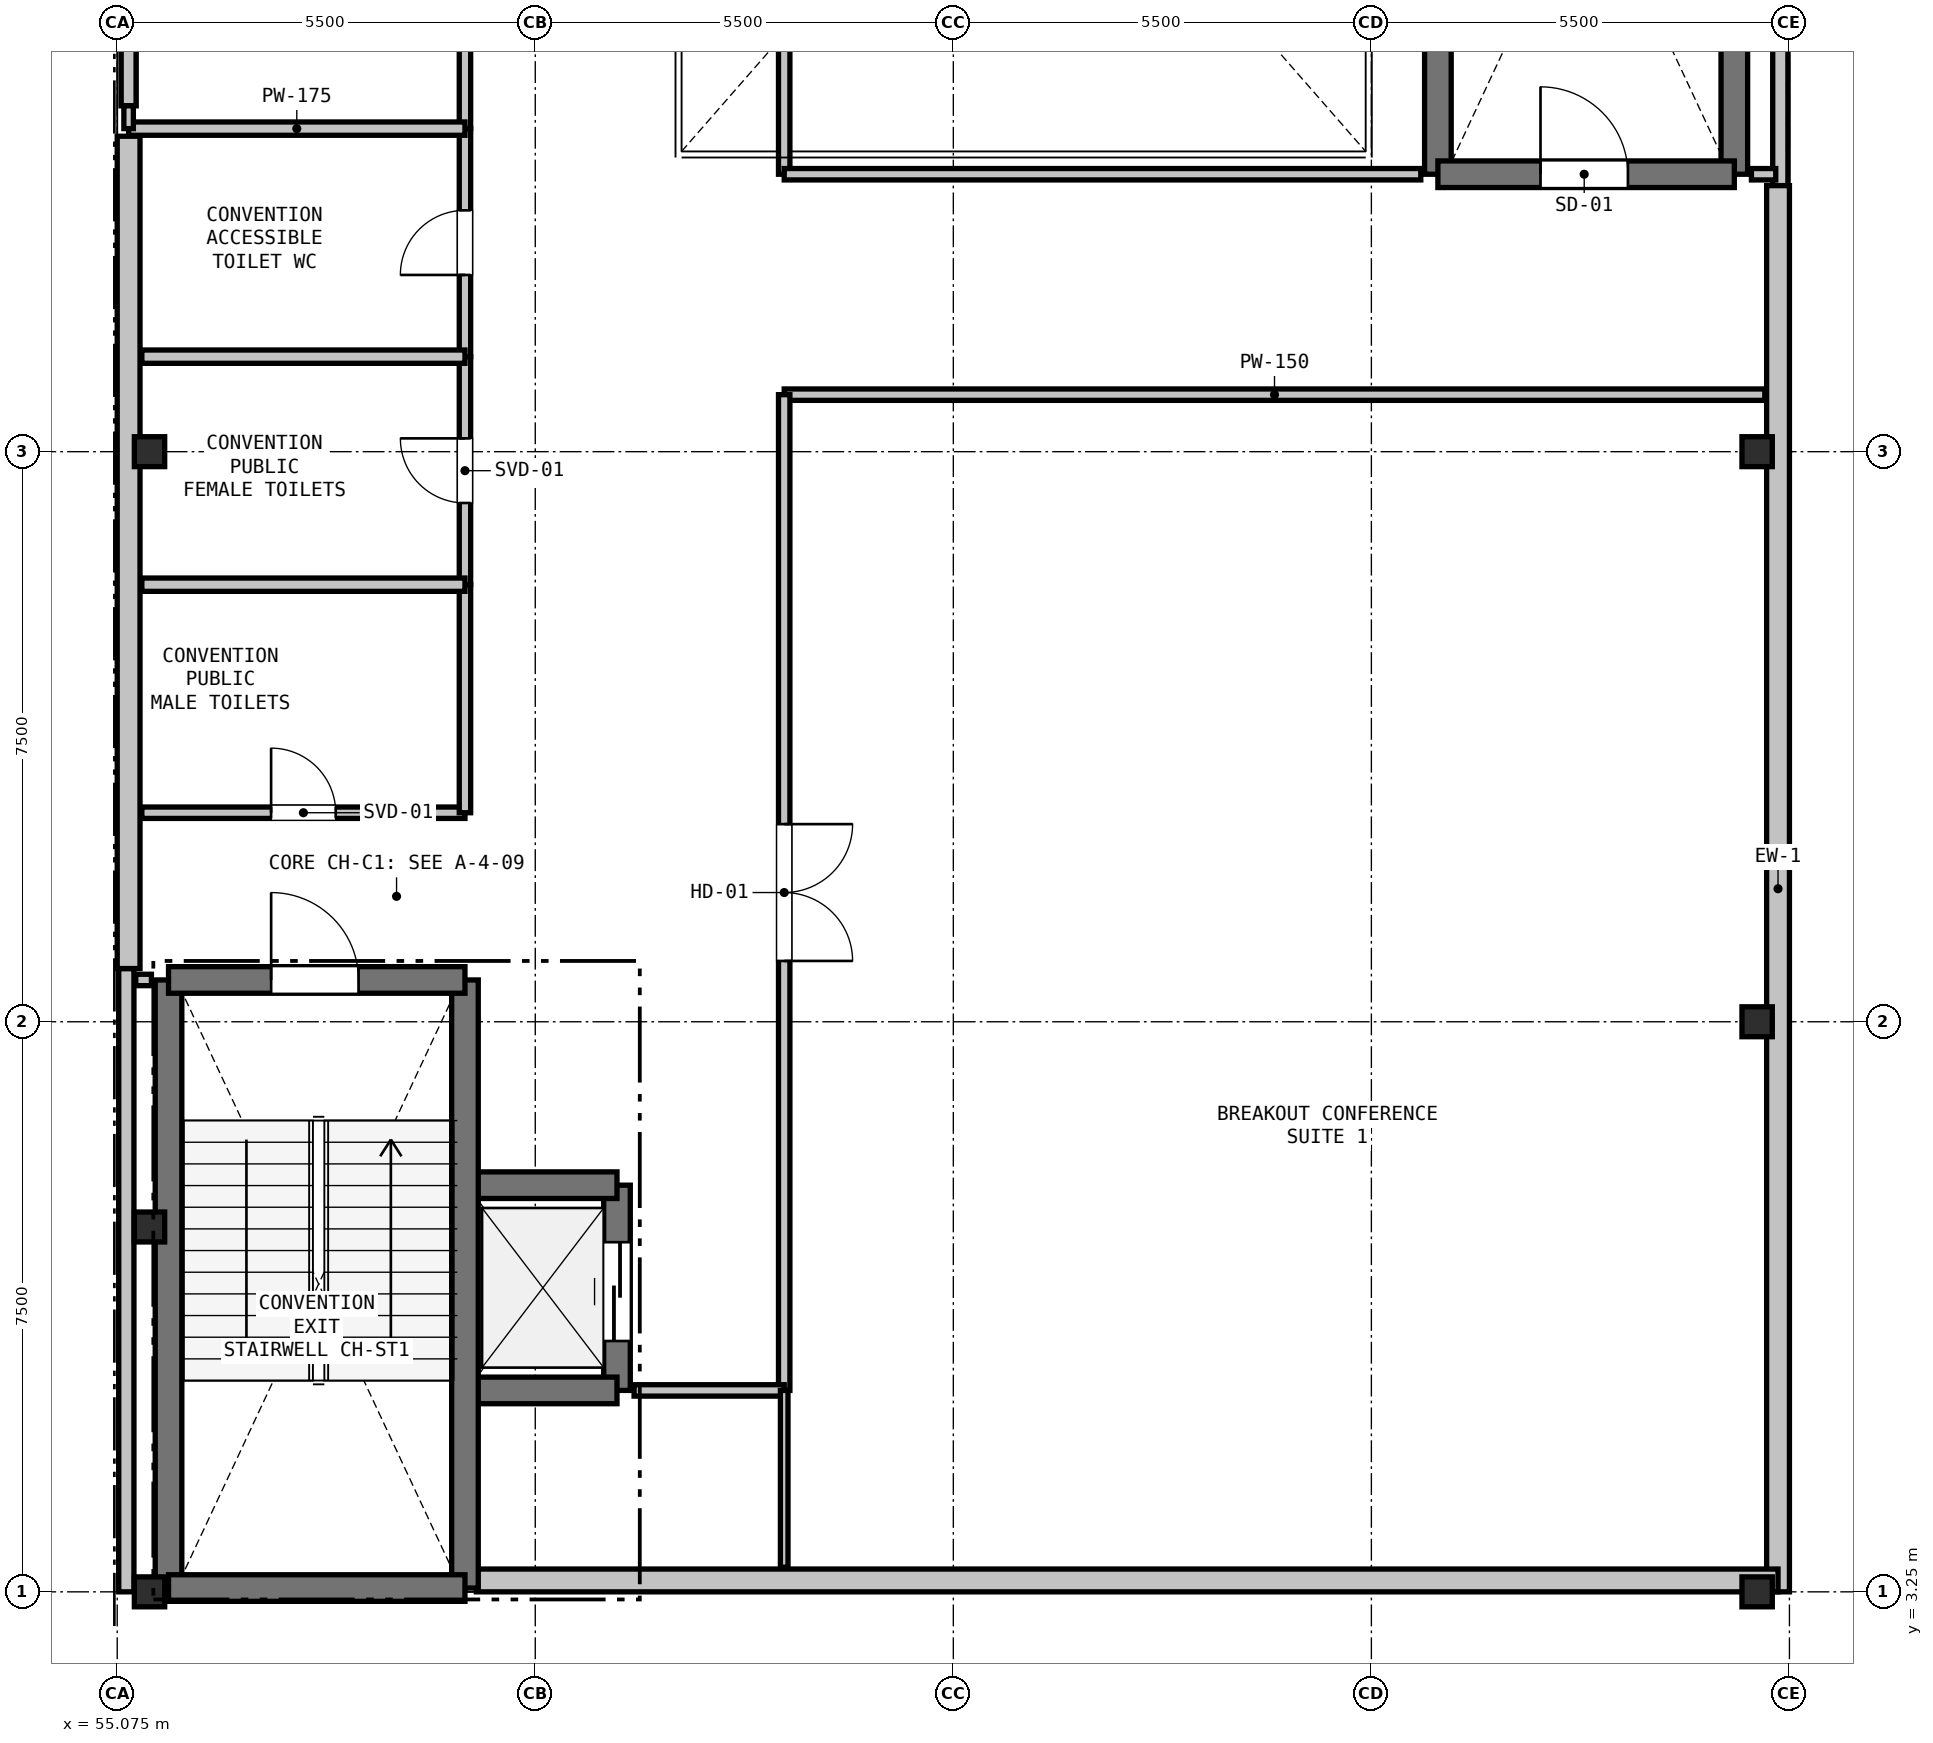
"""IFC4 building model, lengths in metres.
Left out: names, types, materials, properties, quantities, classifications, styles, units other than length and angle.
Written with IfcOpenShell. Run it as: python <this file> out.ifc"""

import sys

from ifc_helpers import new_model, si_unit, direction, frame, frame_2d, origin, origin_2d, place, context, subcontext, project, spatial, rectangle, i_section, extrude, element, fill, save


model = new_model("IFC4")
c1 = context("Model", 3, precision=1e-05, world=origin(), true_north=direction((0.0, 1.0)))
c2 = subcontext(c1, "Body", "Model", "MODEL_VIEW")
j1 = project(units=[si_unit("LENGTHUNIT", "METRE"), si_unit("PLANEANGLEUNIT", "RADIAN")], contexts=[c1])
p1 = place(None, origin())
s1 = spatial("IfcSite", under=j1, at=p1, CompositionType="ELEMENT")
p2 = place(p1, origin())
s2 = spatial("IfcBuilding", under=s1, at=p2, CompositionType="ELEMENT")
p3 = place(p2, frame((0.0, 0.0, 5.1)))
s3 = spatial("IfcBuildingStorey", under=s2, at=p3, CompositionType="ELEMENT", Elevation=5.1)
for number, where, z_axis, x_axis in (
    (1, (55.5, 3.25, 0.0), (0.0, 0.0, 1.0), (1.0, 0.0, 0.0)),
    (2, (55.5, 8.05, 0.0), (0.0, 0.0, 1.0), (1.0, 0.0, 0.0)),
    (3, (55.5, 18.25, 0.0), (0.0, 0.0, 1.0), (1.0, 0.0, 0.0)),
    (4, (76.65, 3.25, 0.0), (0.0, 0.0, 1.0), (1.0, 0.0, 0.0)),
    (5, (76.65, 10.75, 0.0), (0.0, 0.0, 1.0), (1.0, 0.0, 0.0)),
    (6, (76.65, 18.25, 0.0), (0.0, 0.0, 1.0), (1.0, 0.0, 0.0)),
):
    element("IfcColumn", number, at=place(p3, frame(where, z_axis=z_axis, x_axis=x_axis)), inside=s3, PredefinedType="COLUMN", context=c2, shape_type="SweptSolid", body=[
        extrude(i_section(OverallWidth=0.399, OverallDepth=0.394, WebThickness=0.023, FlangeThickness=0.037, at=origin_2d()), origin(), (0.0, 0.0, 1.0), 4.5),
    ])
p4 = place(p3, frame((55.195, 3.25, 0.0), z_axis=(0.0, 0.0, 1.0), x_axis=(0.0, 1.0, 0.0)))
e7 = element("IfcWall", 7, at=p4, inside=s3, PredefinedType="PARAPET", context=c2, shape_type="SweptSolid", body=[
    extrude(rectangle(XDim=8.2, YDim=0.2, at=frame_2d((4.1, 0.0))), origin(), (0.0, 0.0, 1.0), 3.79),
])
p5 = place(p3, frame((76.955, 30.1, 0.0), z_axis=(0.0, 0.0, 1.0), x_axis=(0.0, -1.0, 0.0)))
e8 = element("IfcWall", 8, at=p5, inside=s3, PredefinedType="PARAPET", context=c2, shape_type="SweptSolid", body=[
    extrude(rectangle(XDim=8.35, YDim=0.2, at=frame_2d((4.175, 0.0))), origin(), (0.0, 0.0, 1.0), 3.79),
])
p6 = place(p3, frame((55.225, 11.45, 0.0), z_axis=(0.0, 0.0, 1.0), x_axis=(0.0, 1.0, 0.0)))
e9 = element("IfcWall", 9, at=p6, inside=s3, PredefinedType="SOLIDWALL", context=c2, shape_type="SweptSolid", body=[
    extrude(rectangle(XDim=10.95, YDim=0.3, at=frame_2d((5.475, 0.0))), origin(), (0.0, 0.0, 1.0), 3.79),
])
p7 = place(p3, frame((76.925, 21.75, 0.0), z_axis=(0.0, 0.0, 1.0), x_axis=(0.0, -1.0, 0.0)))
e10 = element("IfcWall", 10, at=p7, inside=s3, PredefinedType="SOLIDWALL", context=c2, shape_type="SweptSolid", body=[
    extrude(rectangle(XDim=18.5, YDim=0.3, at=frame_2d((9.25, 0.0))), origin(), (0.0, 0.0, 1.0), 3.79),
])
p8 = place(p3, frame((76.925, 3.4, 0.0), z_axis=(0.0, 0.0, 1.0), x_axis=(-1.0, 0.0, 0.0)))
e11 = element("IfcWall", 11, at=p8, inside=s3, PredefinedType="SOLIDWALL", context=c2, shape_type="SweptSolid", body=[
    extrude(rectangle(XDim=17.125, YDim=0.3, at=frame_2d((8.562, 0.0))), origin(), (0.0, 0.0, 1.0), 3.238),
])
p9 = place(p3, frame((55.225, 22.8, 0.0), z_axis=(0.0, 0.0, 1.0), x_axis=(0.0, 1.0, 0.0)))
e12 = element("IfcWall", 12, at=p9, inside=s3, PredefinedType="PARAPET", context=c2, shape_type="SweptSolid", body=[
    extrude(rectangle(XDim=16.0, YDim=0.2, at=frame_2d((8.0, 0.0))), origin(), (0.0, 0.0, 1.0), 0.2),
])
p10 = place(p3, frame((61.65, 5.9, 0.0), z_axis=(0.0, 0.0, 1.0), x_axis=(0.0, 1.0, 0.0)))
e13 = element("IfcWall", 13, at=p10, inside=s3, PredefinedType="SHEAR", context=c2, shape_type="SweptSolid", body=[
    extrude(rectangle(XDim=2.7, YDim=0.35, at=frame_2d((1.35, 0.0))), origin(), (0.0, 0.0, 1.0), 4.18),
])
p11 = place(p10, frame((0.65, 0.0, 0.0)))
e14 = element("IfcOpeningElement", 14, at=p11, cuts=e13, PredefinedType="OPENING", context=c2, shape_type="SweptSolid", body=[
    extrude(rectangle(XDim=1.3, YDim=2.2, at=frame_2d((0.65, 1.1))), frame((0.0, 0.185, 0.0), z_axis=(0.0, -1.0, 0.0), x_axis=(1.0, 0.0, 0.0)), (0.0, 0.0, 1.0), 0.37),
])
for number, where, z_axis, x_axis in (
    (15, (59.65, 8.6, 0.0), (0.0, 0.0, 1.0), (1.0, 0.0, 0.0)),
    (16, (59.65, 5.9, 0.0), (0.0, 0.0, 1.0), (1.0, 0.0, 0.0)),
):
    element("IfcWall", number, at=place(p3, frame(where, z_axis=z_axis, x_axis=x_axis)), inside=s3, PredefinedType="SHEAR", context=c2, shape_type="SweptSolid", body=[
        extrude(rectangle(XDim=2.0, YDim=0.35, at=frame_2d((1.0, 0.0))), origin(), (0.0, 0.0, 1.0), 4.18),
    ])
for number, where, z_axis, x_axis in (
    (17, (59.65, 11.3, 0.0), (0.0, 0.0, 1.0), (0.0, -1.0, 0.0)),
    (18, (55.75, 3.3, 0.0), (0.0, 0.0, 1.0), (0.0, 1.0, 0.0)),
):
    element("IfcWall", number, at=place(p3, frame(where, z_axis=z_axis, x_axis=x_axis)), inside=s3, PredefinedType="SHEAR", context=c2, shape_type="SweptSolid", body=[
        extrude(rectangle(XDim=8.0, YDim=0.35, at=frame_2d((4.0, 0.0))), origin(), (0.0, 0.0, 1.0), 4.18),
    ])
p12 = place(p3, frame((55.75, 11.3, 0.0), z_axis=(0.0, 0.0, 1.0), x_axis=(1.0, 0.0, 0.0)))
e19 = element("IfcWall", 19, at=p12, inside=s3, PredefinedType="SHEAR", context=c2, shape_type="SweptSolid", body=[
    extrude(rectangle(XDim=3.9, YDim=0.35, at=frame_2d((1.95, 0.0))), origin(), (0.0, 0.0, 1.0), 4.18),
])
p13 = place(p12, frame((1.35, 0.0, 0.0)))
e20 = element("IfcOpeningElement", 20, at=p13, cuts=e19, PredefinedType="OPENING", context=c2, shape_type="SweptSolid", body=[
    extrude(rectangle(XDim=1.15, YDim=2.15, at=frame_2d((0.575, 1.075))), frame((0.0, 0.185, 0.0), z_axis=(0.0, -1.0, 0.0), x_axis=(1.0, 0.0, 0.0)), (0.0, 0.0, 1.0), 0.37),
])
p14 = place(p3, frame((55.75, 3.3, 0.0), z_axis=(0.0, 0.0, 1.0), x_axis=(1.0, 0.0, 0.0)))
e21 = element("IfcWall", 21, at=p14, inside=s3, PredefinedType="SHEAR", context=c2, shape_type="SweptSolid", body=[
    extrude(rectangle(XDim=3.9, YDim=0.35, at=frame_2d((1.95, 0.0))), origin(), (0.0, 0.0, 1.0), 4.18),
])
for number, where, z_axis, x_axis in (
    (22, (76.35, 29.9, 0.0), (0.0, 0.0, 1.0), (0.0, -1.0, 0.0)),
    (23, (72.45, 21.9, 0.0), (0.0, 0.0, 1.0), (0.0, 1.0, 0.0)),
):
    element("IfcWall", number, at=place(p3, frame(where, z_axis=z_axis, x_axis=x_axis)), inside=s3, PredefinedType="SHEAR", context=c2, shape_type="SweptSolid", body=[
        extrude(rectangle(XDim=8.0, YDim=0.35, at=frame_2d((4.0, 0.0))), origin(), (0.0, 0.0, 1.0), 4.18),
    ])
p15 = place(p3, frame((72.45, 21.9, 0.0), z_axis=(0.0, 0.0, 1.0), x_axis=(1.0, 0.0, 0.0)))
e24 = element("IfcWall", 24, at=p15, inside=s3, PredefinedType="SHEAR", context=c2, shape_type="SweptSolid", body=[
    extrude(rectangle(XDim=3.9, YDim=0.35, at=frame_2d((1.95, 0.0))), origin(), (0.0, 0.0, 1.0), 4.18),
])
p16 = place(p15, frame((1.35, 0.0, 0.0)))
e25 = element("IfcOpeningElement", 25, at=p16, cuts=e24, PredefinedType="OPENING", context=c2, shape_type="SweptSolid", body=[
    extrude(rectangle(XDim=1.15, YDim=2.15, at=frame_2d((0.575, 1.075))), frame((0.0, 0.185, 0.0), z_axis=(0.0, -1.0, 0.0), x_axis=(1.0, 0.0, 0.0)), (0.0, 0.0, 1.0), 0.37),
])
p17 = place(p3, frame((55.525, 11.3, 0.0), z_axis=(0.0, 0.0, 1.0), x_axis=(-1.0, 0.0, 0.0)))
e26 = element("IfcWall", 26, at=p17, inside=s3, PredefinedType="PARTITIONING", context=c2, shape_type="SweptSolid", body=[
    extrude(rectangle(XDim=0.206, YDim=0.15, at=frame_2d((0.103, 0.0))), origin(), (0.0, 0.0, 1.0), 3.79),
])
p18 = place(p3, frame((55.399, 13.5, 0.0), z_axis=(0.0, 0.0, 1.0), x_axis=(1.0, 0.0, 0.0)))
e27 = element("IfcWall", 27, at=p18, inside=s3, PredefinedType="PARTITIONING", context=c2, shape_type="SweptSolid", body=[
    extrude(rectangle(XDim=4.251, YDim=0.15, at=frame_2d((2.125, 0.0))), origin(), (0.0, 0.0, 1.0), 3.79),
])
p19 = place(p18, frame((1.7, 0.0, 0.0)))
e28 = element("IfcOpeningElement", 28, at=p19, cuts=e27, PredefinedType="OPENING", context=c2, shape_type="SweptSolid", body=[
    extrude(rectangle(XDim=0.85, YDim=2.1, at=frame_2d((0.425, 1.05))), frame((0.0, 0.085, 0.0), z_axis=(0.0, -1.0, 0.0), x_axis=(1.0, 0.0, 0.0)), (0.0, 0.0, 1.0), 0.17),
])
p20 = place(p3, frame((59.65, 13.5, 0.0), z_axis=(0.0, 0.0, 1.0), x_axis=(0.0, 1.0, 0.0)))
e29 = element("IfcWall", 29, at=p20, inside=s3, PredefinedType="PARTITIONING", context=c2, shape_type="SweptSolid", body=[
    extrude(rectangle(XDim=3.0, YDim=0.15, at=frame_2d((1.5, 0.0))), origin(), (0.0, 0.0, 1.0), 4.18),
])
p21 = place(p3, frame((59.65, 16.5, 0.0), z_axis=(0.0, 0.0, 1.0), x_axis=(0.0, 1.0, 0.0)))
e30 = element("IfcWall", 30, at=p21, inside=s3, PredefinedType="PARTITIONING", context=c2, shape_type="SweptSolid", body=[
    extrude(rectangle(XDim=3.0, YDim=0.15, at=frame_2d((1.5, 0.0))), origin(), (0.0, 0.0, 1.0), 3.238),
])
p22 = place(p21, frame((1.075, 0.0, 0.0)))
e31 = element("IfcOpeningElement", 31, at=p22, cuts=e30, PredefinedType="OPENING", context=c2, shape_type="SweptSolid", body=[
    extrude(rectangle(XDim=0.85, YDim=2.1, at=frame_2d((0.425, 1.05))), frame((0.0, 0.085, 0.0), z_axis=(0.0, -1.0, 0.0), x_axis=(1.0, 0.0, 0.0)), (0.0, 0.0, 1.0), 0.17),
])
p23 = place(p3, frame((59.65, 19.5, 0.0), z_axis=(0.0, 0.0, 1.0), x_axis=(0.0, 1.0, 0.0)))
e32 = element("IfcWall", 32, at=p23, inside=s3, PredefinedType="PARTITIONING", context=c2, shape_type="SweptSolid", body=[
    extrude(rectangle(XDim=3.0, YDim=0.15, at=frame_2d((1.5, 0.0))), origin(), (0.0, 0.0, 1.0), 4.18),
])
p24 = place(p23, frame((1.075, 0.0, 0.0)))
e33 = element("IfcOpeningElement", 33, at=p24, cuts=e32, PredefinedType="OPENING", context=c2, shape_type="SweptSolid", body=[
    extrude(rectangle(XDim=0.85, YDim=2.1, at=frame_2d((0.425, 1.05))), frame((0.0, 0.085, 0.0), z_axis=(0.0, -1.0, 0.0), x_axis=(1.0, 0.0, 0.0)), (0.0, 0.0, 1.0), 0.17),
])
p25 = place(p3, frame((59.65, 22.5, 0.0), z_axis=(0.0, 0.0, 1.0), x_axis=(0.0, 1.0, 0.0)))
e34 = element("IfcWall", 34, at=p25, inside=s3, PredefinedType="PARTITIONING", context=c2, shape_type="SweptSolid", body=[
    extrude(rectangle(XDim=15.5, YDim=0.15, at=frame_2d((7.75, 0.0))), origin(), (0.0, 0.0, 1.0), 3.238),
])
p26 = place(p25, frame((7.25, 0.0, 0.0)))
e35 = element("IfcOpeningElement", 35, at=p26, cuts=e34, PredefinedType="OPENING", context=c2, shape_type="SweptSolid", body=[
    extrude(rectangle(XDim=1.0, YDim=2.15, at=frame_2d((0.5, 1.075))), frame((0.0, 0.085, 0.0), z_axis=(0.0, -1.0, 0.0), x_axis=(1.0, 0.0, 0.0)), (0.0, 0.0, 1.0), 0.17),
])
p27 = place(p3, frame((63.85, 33.0, 0.0), z_axis=(0.0, 0.0, 1.0), x_axis=(0.0, -1.0, 0.0)))
e36 = element("IfcWall", 36, at=p27, inside=s3, PredefinedType="PARTITIONING", context=c2, shape_type="SweptSolid", body=[
    extrude(rectangle(XDim=11.1, YDim=0.15, at=frame_2d((5.55, 0.0))), origin(), (0.0, 0.0, 1.0), 3.238),
])
p28 = place(p3, frame((63.85, 21.9, 0.0), z_axis=(0.0, 0.0, 1.0), x_axis=(1.0, 0.0, 0.0)))
e37 = element("IfcWall", 37, at=p28, inside=s3, PredefinedType="PARTITIONING", context=c2, shape_type="SweptSolid", body=[
    extrude(rectangle(XDim=8.375, YDim=0.15, at=frame_2d((4.188, 0.0))), origin(), (0.0, 0.0, 1.0), 3.858),
])
p29 = place(p3, frame((76.575, 21.9, 0.0), z_axis=(0.0, 0.0, 1.0), x_axis=(1.0, 0.0, 0.0)))
e38 = element("IfcWall", 38, at=p29, inside=s3, PredefinedType="PARTITIONING", context=c2, shape_type="SweptSolid", body=[
    extrude(rectangle(XDim=0.32, YDim=0.15, at=frame_2d((0.16, 0.0))), origin(), (0.0, 0.0, 1.0), 3.79),
])
p30 = place(p3, frame((76.751, 19.0, 0.0), z_axis=(0.0, 0.0, 1.0), x_axis=(-1.0, 0.0, 0.0)))
e39 = element("IfcWall", 39, at=p30, inside=s3, PredefinedType="PARTITIONING", context=c2, shape_type="SweptSolid", body=[
    extrude(rectangle(XDim=12.901, YDim=0.15, at=frame_2d((6.45, 0.0))), origin(), (0.0, 0.0, 1.0), 3.79),
])
p31 = place(p3, frame((63.85, 19.0, 0.0), z_axis=(0.0, 0.0, 1.0), x_axis=(0.0, -1.0, 0.0)))
e40 = element("IfcWall", 40, at=p31, inside=s3, PredefinedType="PARTITIONING", context=c2, shape_type="SweptSolid", body=[
    extrude(rectangle(XDim=13.1, YDim=0.15, at=frame_2d((6.55, 0.0))), origin(), (0.0, 0.0, 1.0), 3.238),
])
p32 = place(p31, frame((5.65, 0.0, 0.0)))
e41 = element("IfcOpeningElement", 41, at=p32, cuts=e40, PredefinedType="OPENING", context=c2, shape_type="SweptSolid", body=[
    extrude(rectangle(XDim=1.8, YDim=2.2, at=frame_2d((0.9, 1.1))), frame((0.0, 0.085, 0.0), z_axis=(0.0, -1.0, 0.0), x_axis=(1.0, 0.0, 0.0)), (0.0, 0.0, 1.0), 0.17),
])
p33 = place(p3, frame((63.85, 5.9, 0.0), z_axis=(0.0, 0.0, 1.0), x_axis=(-1.0, 0.0, 0.0)))
e42 = element("IfcWall", 42, at=p33, inside=s3, PredefinedType="PARTITIONING", context=c2, shape_type="SweptSolid", body=[
    extrude(rectangle(XDim=1.975, YDim=0.15, at=frame_2d((0.988, 0.0))), origin(), (0.0, 0.0, 1.0), 3.858),
])
for number, where, z_axis, x_axis in (
    (43, (55.399, 16.5, 0.0), (0.0, 0.0, 1.0), (1.0, 0.0, 0.0)),
    (44, (55.399, 19.5, 0.0), (0.0, 0.0, 1.0), (1.0, 0.0, 0.0)),
):
    element("IfcWall", number, at=place(p3, frame(where, z_axis=z_axis, x_axis=x_axis)), inside=s3, PredefinedType="PLUMBINGWALL", context=c2, shape_type="SweptSolid", body=[
        extrude(rectangle(XDim=4.251, YDim=0.175, at=frame_2d((2.125, 0.0))), origin(), (0.0, 0.0, 1.0), 3.79),
    ])
p34 = place(p3, frame((55.225, 22.5, 0.0), z_axis=(0.0, 0.0, 1.0), x_axis=(1.0, 0.0, 0.0)))
e45 = element("IfcWall", 45, at=p34, inside=s3, PredefinedType="PLUMBINGWALL", context=c2, shape_type="SweptSolid", body=[
    extrude(rectangle(XDim=4.425, YDim=0.175, at=frame_2d((2.212, 0.0))), origin(), (0.0, 0.0, 1.0), 3.79),
])
p35 = place(p3, frame((55.225, 22.5, 0.0), z_axis=(0.0, 0.0, 1.0), x_axis=(0.0, 1.0, 0.0)))
e46 = element("IfcWall", 46, at=p35, inside=s3, PredefinedType="PARTITIONING", context=c2, shape_type="SweptSolid", body=[
    extrude(rectangle(XDim=0.3, YDim=0.125, at=frame_2d((0.15, 0.0))), origin(), (0.0, 0.0, 1.0), 3.79),
])
p36 = place(p3, frame((63.85, 3.574, 0.0), z_axis=(0.0, 0.0, 1.0), x_axis=(0.0, 1.0, 0.0)))
e47 = element("IfcWall", 47, at=p36, inside=s3, PredefinedType="PARTITIONING", context=c2, shape_type="SweptSolid", body=[
    extrude(rectangle(XDim=2.326, YDim=0.1, at=frame_2d((1.163, 0.0))), origin(), (0.0, 0.0, 1.0), 4.18),
])
p37 = place(p11, origin())
e48 = element("IfcDoor", 48, at=p37, inside=s3, OperationType="SLIDING_TO_LEFT", PredefinedType="DOOR", context=c2, shape_type="SweptSolid", body=[
    extrude(rectangle(XDim=1.3, YDim=2.2, at=frame_2d((0.65, 1.1))), frame((0.0, 0.025, 0.0), z_axis=(0.0, -1.0, 0.0), x_axis=(1.0, 0.0, 0.0)), (0.0, 0.0, 1.0), 0.05),
])
fill(e14, e48)
p38 = place(p13, origin())
e49 = element("IfcDoor", 49, at=p38, inside=s3, OperationType="SINGLE_SWING_LEFT", PredefinedType="DOOR", context=c2, shape_type="SweptSolid", body=[
    extrude(rectangle(XDim=1.15, YDim=2.15, at=frame_2d((0.575, 1.075))), frame((0.0, 0.025, 0.0), z_axis=(0.0, -1.0, 0.0), x_axis=(1.0, 0.0, 0.0)), (0.0, 0.0, 1.0), 0.05),
])
fill(e20, e49)
p39 = place(p16, origin())
e50 = element("IfcDoor", 50, at=p39, inside=s3, OperationType="SINGLE_SWING_LEFT", PredefinedType="DOOR", context=c2, shape_type="SweptSolid", body=[
    extrude(rectangle(XDim=1.15, YDim=2.15, at=frame_2d((0.575, 1.075))), frame((0.0, 0.025, 0.0), z_axis=(0.0, -1.0, 0.0), x_axis=(1.0, 0.0, 0.0)), (0.0, 0.0, 1.0), 0.05),
])
fill(e25, e50)
p40 = place(p19, origin())
e51 = element("IfcDoor", 51, at=p40, inside=s3, OperationType="SINGLE_SWING_LEFT", PredefinedType="DOOR", context=c2, shape_type="SweptSolid", body=[
    extrude(rectangle(XDim=0.85, YDim=2.1, at=frame_2d((0.425, 1.05))), frame((0.0, 0.025, 0.0), z_axis=(0.0, -1.0, 0.0), x_axis=(1.0, 0.0, 0.0)), (0.0, 0.0, 1.0), 0.05),
])
fill(e28, e51)
p41 = place(p22, origin())
e52 = element("IfcDoor", 52, at=p41, inside=s3, OperationType="SINGLE_SWING_RIGHT", PredefinedType="DOOR", context=c2, shape_type="SweptSolid", body=[
    extrude(rectangle(XDim=0.85, YDim=2.1, at=frame_2d((0.425, 1.05))), frame((0.0, 0.025, 0.0), z_axis=(0.0, -1.0, 0.0), x_axis=(1.0, 0.0, 0.0)), (0.0, 0.0, 1.0), 0.05),
])
fill(e31, e52)
p42 = place(p24, origin())
e53 = element("IfcDoor", 53, at=p42, inside=s3, OperationType="SINGLE_SWING_LEFT", PredefinedType="DOOR", context=c2, shape_type="SweptSolid", body=[
    extrude(rectangle(XDim=0.85, YDim=2.1, at=frame_2d((0.425, 1.05))), frame((0.0, 0.025, 0.0), z_axis=(0.0, -1.0, 0.0), x_axis=(1.0, 0.0, 0.0)), (0.0, 0.0, 1.0), 0.05),
])
fill(e33, e53)
p43 = place(p32, origin())
e54 = element("IfcDoor", 54, at=p43, inside=s3, OperationType="DOUBLE_DOOR_SINGLE_SWING", PredefinedType="DOOR", context=c2, shape_type="SweptSolid", body=[
    extrude(rectangle(XDim=1.8, YDim=2.2, at=frame_2d((0.9, 1.1))), frame((0.0, 0.025, 0.0), z_axis=(0.0, -1.0, 0.0), x_axis=(1.0, 0.0, 0.0)), (0.0, 0.0, 1.0), 0.05),
])
fill(e41, e54)
save(model, sys.argv[1])
